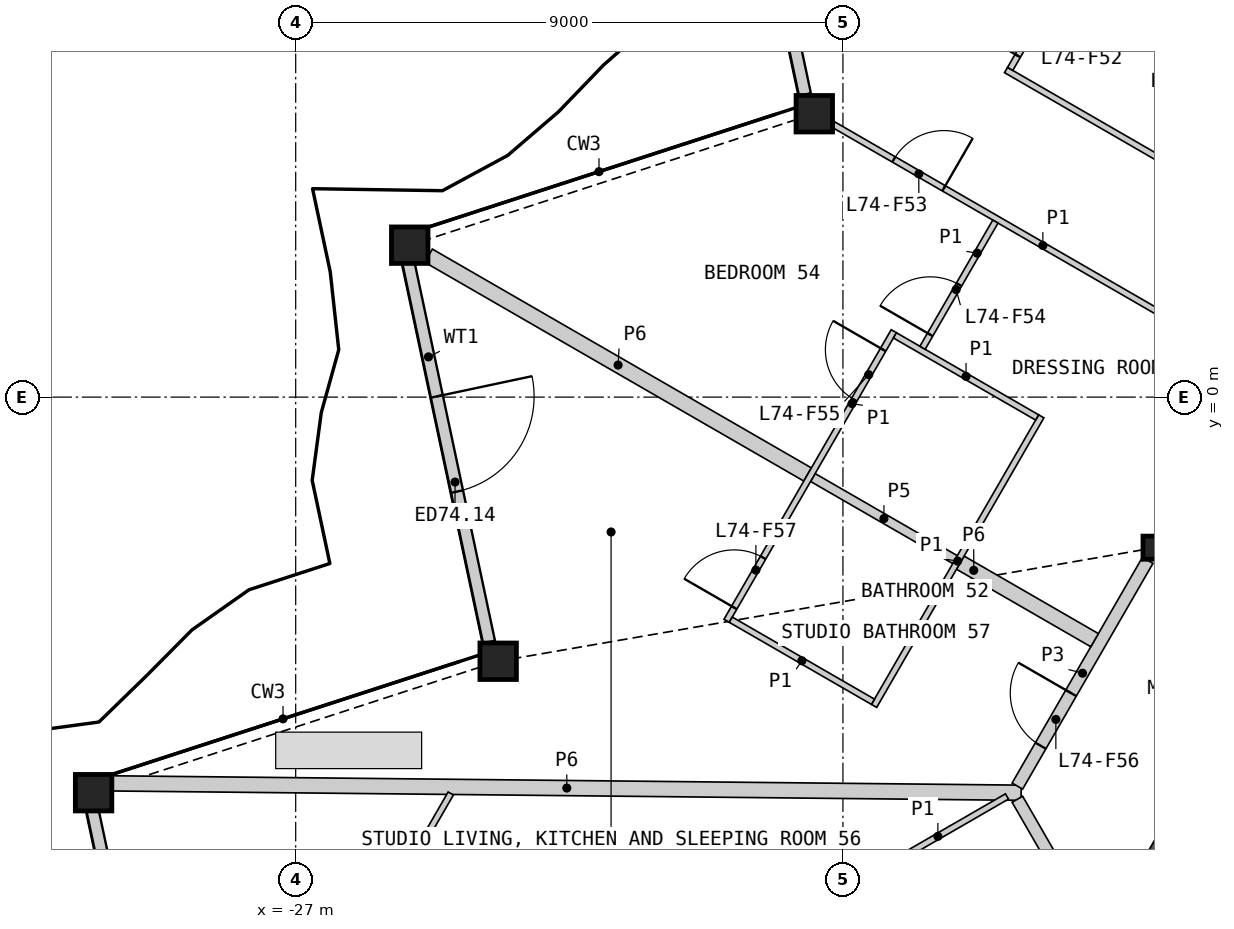
"""IFC4 building model, lengths in metres.
Left out: names, types, materials, properties, quantities, classifications, styles, units other than length and angle.
Written with IfcOpenShell. Run it as: python <this file> out.ifc"""

import sys

from ifc_helpers import new_model, si_unit, direction, frame, frame_2d, origin, origin_2d, place, context, subcontext, project, spatial, polyline, rectangle, hollow_rectangle, i_section, outline, extrude, element, fill, save


model = new_model("IFC4")
c1 = context("Model", 3, precision=1e-05, world=origin(), true_north=direction((0.0, 1.0)))
c2 = subcontext(c1, "Body", "Model", "MODEL_VIEW")
j1 = project(units=[si_unit("LENGTHUNIT", "METRE"), si_unit("PLANEANGLEUNIT", "RADIAN")], contexts=[c1])
p1 = place(None, origin())
s1 = spatial("IfcSite", under=j1, at=p1, CompositionType="ELEMENT")
p2 = place(p1, origin())
s2 = spatial("IfcBuilding", under=s1, at=p2, CompositionType="ELEMENT")
p3 = place(p2, frame((0.0, 0.0, 332.4)))
s3 = spatial("IfcBuildingStorey", under=s2, at=p3, CompositionType="ELEMENT", Elevation=332.4)
for number, where, z_axis, x_axis in (
    (1, (-18.471, 4.661, 0.0), (0.0, 0.0, 1.0), (1.0, 0.0, 0.0)),
    (2, (-25.125, 2.499, 0.0), (0.0, 0.0, 1.0), (1.0, 0.0, 0.0)),
    (3, (-23.67, -4.344, 0.0), (0.0, 0.0, 1.0), (1.0, 0.0, 0.0)),
    (4, (-30.324, -6.506, 0.0), (0.0, 0.0, 1.0), (1.0, 0.0, 0.0)),
):
    element("IfcColumn", number, at=place(p3, frame(where, z_axis=z_axis, x_axis=x_axis)), inside=s3, PredefinedType="COLUMN", context=c2, shape_type="SweptSolid", body=[
        extrude(hollow_rectangle(XDim=0.6, YDim=0.6, WallThickness=0.04, at=origin_2d()), origin(), (0.0, 0.0, 1.0), 3.4),
    ])
p4 = place(p3, frame((-12.868, -2.476, 0.0), z_axis=(0.0, 0.0, 1.0), x_axis=(1.0, 0.0, 0.0)))
e5 = element("IfcColumn", 5, at=p4, inside=s3, PredefinedType="COLUMN", context=c2, shape_type="SweptSolid", body=[
    extrude(i_section(OverallWidth=0.396, OverallDepth=0.381, WebThickness=0.019, FlangeThickness=0.03, at=origin_2d()), origin(), (0.0, 0.0, 1.0), 3.4),
])
p5 = place(p3, frame((-19.953, 11.225, 0.0), z_axis=(0.0, 0.0, 1.0), x_axis=(0.207915447, -0.978146802325, 0.0)))
e6 = element("IfcWall", 6, at=p5, inside=s3, PredefinedType="SOLIDWALL", context=c2, shape_type="SweptSolid", body=[
    extrude(rectangle(XDim=6.387, YDim=0.2, at=frame_2d((3.193, 0.0))), origin(), (0.0, 0.0, 1.0), 2.488),
])
p6 = place(p5, frame((2.262, 0.0, 0.0)))
e7 = element("IfcOpeningElement", 7, at=p6, cuts=e6, PredefinedType="OPENING", context=c2, shape_type="SweptSolid", body=[
    extrude(rectangle(XDim=1.6, YDim=2.25, at=frame_2d((0.8, 1.125))), frame((0.0, 0.11, 0.0), z_axis=(0.0, -1.0, 0.0), x_axis=(1.0, 0.0, 0.0)), (0.0, 0.0, 1.0), 0.22),
])
p7 = place(p3, frame((-25.149, 2.224, 0.0), z_axis=(0.0, 0.0, 1.0), x_axis=(0.207906266269, -0.978148753742, 0.0)))
e8 = element("IfcWall", 8, at=p7, inside=s3, PredefinedType="SOLIDWALL", context=c2, shape_type="SweptSolid", body=[
    extrude(rectangle(XDim=6.392, YDim=0.2, at=frame_2d((3.196, 0.0))), origin(), (0.0, 0.0, 1.0), 2.488),
])
p8 = place(p7, frame((2.262, 0.0, 0.0)))
e9 = element("IfcOpeningElement", 9, at=p8, cuts=e8, PredefinedType="OPENING", context=c2, shape_type="SweptSolid", body=[
    extrude(rectangle(XDim=1.6, YDim=2.25, at=frame_2d((0.8, 1.125))), frame((0.0, 0.11, 0.0), z_axis=(0.0, -1.0, 0.0), x_axis=(1.0, 0.0, 0.0)), (0.0, 0.0, 1.0), 0.22),
])
p9 = place(p3, frame((-30.345, -6.776, 0.0), z_axis=(0.0, 0.0, 1.0), x_axis=(0.207897099812, -0.978150702034, 0.0)))
e10 = element("IfcWall", 10, at=p9, inside=s3, PredefinedType="SOLIDWALL", context=c2, shape_type="SweptSolid", body=[
    extrude(rectangle(XDim=6.396, YDim=0.2, at=frame_2d((3.198, 0.0))), origin(), (0.0, 0.0, 1.0), 2.488),
])
p10 = place(p9, frame((2.262, 0.0, 0.0)))
e11 = element("IfcOpeningElement", 11, at=p10, cuts=e10, PredefinedType="OPENING", context=c2, shape_type="SweptSolid", body=[
    extrude(rectangle(XDim=1.6, YDim=2.25, at=frame_2d((0.8, 1.125))), frame((0.0, 0.11, 0.0), z_axis=(0.0, -1.0, 0.0), x_axis=(1.0, 0.0, 0.0)), (0.0, 0.0, 1.0), 0.22),
])
p11 = place(p3, origin())
e12 = element("IfcWall", 12, at=p11, inside=s3, PredefinedType="SHEAR", context=c2, shape_type="SweptSolid", body=[
    extrude(outline(polyline([(-12.48, -6.606), (-11.961, -6.906), (-11.961, -7.506), (-13.0, -7.506), (-12.48, -6.606)])), origin(), (0.0, 0.0, 1.0), 3.1),
])
p12 = place(p3, frame((-30.014, -6.353, 0.0), z_axis=(0.0, 0.0, 1.0), x_axis=(0.999946875776, -0.010307551845, 0.0)))
e13 = element("IfcWall", 13, at=p12, inside=s3, PredefinedType="PARTITIONING", context=c2, shape_type="SweptSolid", body=[
    extrude(rectangle(XDim=14.946, YDim=0.25, at=frame_2d((7.473, 0.0))), origin(), (0.0, 0.0, 1.0), 2.33),
])
p13 = place(p3, frame((-19.615, 11.325, 0.0), z_axis=(0.0, 0.0, 1.0), x_axis=(0.86602139559, -0.500006942333, 0.0)))
e14 = element("IfcWall", 14, at=p13, inside=s3, PredefinedType="PARTITIONING", context=c2, shape_type="SweptSolid", body=[
    extrude(rectangle(XDim=12.505, YDim=0.25, at=frame_2d((6.252, 0.0))), origin(), (0.0, 0.0, 1.0), 2.33),
])
p14 = place(p3, frame((-24.815, 2.326, 0.0), z_axis=(0.0, 0.0, 1.0), x_axis=(0.866024038922, -0.500002364004, 0.0)))
e15 = element("IfcWall", 15, at=p14, inside=s3, PredefinedType="PARTITIONING", context=c2, shape_type="SweptSolid", body=[
    extrude(rectangle(XDim=7.198, YDim=0.25, at=frame_2d((3.599, 0.0))), origin(), (0.0, 0.0, 1.0), 2.33),
])
p15 = place(p3, frame((-15.131, -6.397, 0.0), z_axis=(0.0, 0.0, 1.0), x_axis=(0.500003406062, 0.866023437285, 0.0)))
e16 = element("IfcWall", 16, at=p15, inside=s3, PredefinedType="PARTITIONING", context=c2, shape_type="SweptSolid", body=[
    extrude(rectangle(XDim=4.288, YDim=0.2, at=frame_2d((2.144, 0.0))), origin(), (0.0, 0.0, 1.0), 3.1),
])
p16 = place(p15, frame((0.766, 0.0, 0.0)))
e17 = element("IfcOpeningElement", 17, at=p16, cuts=e16, PredefinedType="OPENING", context=c2, shape_type="SweptSolid", body=[
    extrude(rectangle(XDim=1.0, YDim=2.1, at=frame_2d((0.5, 1.05))), frame((0.0, 0.11, 0.0), z_axis=(0.0, -1.0, 0.0), x_axis=(1.0, 0.0, 0.0)), (0.0, 0.0, 1.0), 0.22),
])
p17 = place(p3, frame((-15.131, -6.614, 0.0), z_axis=(0.0, 0.0, 1.0), x_axis=(0.499967746641, -0.866044024469, 0.0)))
e18 = element("IfcWall", 18, at=p17, inside=s3, PredefinedType="PARTITIONING", context=c2, shape_type="SweptSolid", body=[
    extrude(rectangle(XDim=3.676, YDim=0.2, at=frame_2d((1.838, 0.0))), origin(), (0.0, 0.0, 1.0), 3.1),
])
p18 = place(p17, frame((2.426, 0.0, 0.0)))
e19 = element("IfcOpeningElement", 19, at=p18, cuts=e18, PredefinedType="OPENING", context=c2, shape_type="SweptSolid", body=[
    extrude(rectangle(XDim=1.0, YDim=2.1, at=frame_2d((0.5, 1.05))), frame((0.0, 0.11, 0.0), z_axis=(0.0, -1.0, 0.0), x_axis=(1.0, 0.0, 0.0)), (0.0, 0.0, 1.0), 0.22),
])
p19 = place(p3, frame((-16.07, -2.722, 0.0), z_axis=(0.0, 0.0, 1.0), x_axis=(0.866030925526, -0.499990435942, 0.0)))
e20 = element("IfcWall", 20, at=p19, inside=s3, PredefinedType="PARTITIONING", context=c2, shape_type="SweptSolid", body=[
    extrude(rectangle(XDim=2.55, YDim=0.25, at=frame_2d((1.275, 0.0))), origin(), (0.0, 0.0, 1.0), 2.33),
])
p20 = place(p3, frame((-18.495, -1.323, 0.0), z_axis=(0.0, 0.0, 1.0), x_axis=(0.866059108428, -0.4999416173, 0.0)))
e21 = element("IfcWall", 21, at=p20, inside=s3, PredefinedType="PLUMBINGWALL", context=c2, shape_type="SweptSolid", body=[
    extrude(rectangle(XDim=2.7, YDim=0.15, at=frame_2d((1.35, 0.0))), origin(), (0.0, 0.0, 1.0), 2.33),
])
p21 = place(p3, frame((-18.161, 4.485, 0.0), z_axis=(0.0, 0.0, 1.0), x_axis=(0.866023773276, -0.500002824113, 0.0)))
e22 = element("IfcWall", 22, at=p21, inside=s3, PredefinedType="PARTITIONING", context=c2, shape_type="SweptSolid", body=[
    extrude(rectangle(XDim=7.965, YDim=0.1, at=frame_2d((3.982, 0.0))), origin(), (0.0, 0.0, 1.0), 2.33),
])
p22 = place(p21, frame((1.152, 0.0, 0.0)))
e23 = element("IfcOpeningElement", 23, at=p22, cuts=e22, PredefinedType="OPENING", context=c2, shape_type="SweptSolid", body=[
    extrude(rectangle(XDim=0.95, YDim=2.1, at=frame_2d((0.475, 1.05))), frame((0.0, 0.06, 0.0), z_axis=(0.0, -1.0, 0.0), x_axis=(1.0, 0.0, 0.0)), (0.0, 0.0, 1.0), 0.12),
])
p23 = place(p3, frame((-15.318, 5.38, 0.0), z_axis=(0.0, 0.0, 1.0), x_axis=(0.866035260786, -0.499982926783, 0.0)))
e24 = element("IfcWall", 24, at=p23, inside=s3, PredefinedType="PARTITIONING", context=c2, shape_type="SweptSolid", body=[
    extrude(rectangle(XDim=5.95, YDim=0.1, at=frame_2d((2.975, 0.0))), origin(), (0.0, 0.0, 1.0), 2.33),
])
p24 = place(p3, frame((-17.488, -5.079, 0.0), z_axis=(0.0, 0.0, 1.0), x_axis=(0.499996545922, 0.866027397988, 0.0)))
e25 = element("IfcWall", 25, at=p24, inside=s3, PredefinedType="PARTITIONING", context=c2, shape_type="SweptSolid", body=[
    extrude(rectangle(XDim=5.5, YDim=0.1, at=frame_2d((2.75, 0.0))), origin(), (0.0, 0.0, 1.0), 2.33),
])
p25 = place(p3, frame((-19.913, -3.679, 0.0), z_axis=(0.0, 0.0, 1.0), x_axis=(0.500015767406, 0.866016300277, 0.0)))
e26 = element("IfcWall", 26, at=p25, inside=s3, PredefinedType="PARTITIONING", context=c2, shape_type="SweptSolid", body=[
    extrude(rectangle(XDim=5.5, YDim=0.1, at=frame_2d((2.75, 0.0))), origin(), (0.0, 0.0, 1.0), 2.33),
])
p26 = place(p25, frame((4.199, 0.0, 0.0)))
e27 = element("IfcOpeningElement", 27, at=p26, cuts=e26, PredefinedType="OPENING", context=c2, shape_type="SweptSolid", body=[
    extrude(rectangle(XDim=0.95, YDim=2.1, at=frame_2d((0.475, 1.05))), frame((0.0, 0.06, 0.0), z_axis=(0.0, -1.0, 0.0), x_axis=(1.0, 0.0, 0.0)), (0.0, 0.0, 1.0), 0.12),
])
p27 = place(p25, frame((0.25, 0.0, 0.0)))
e28 = element("IfcOpeningElement", 28, at=p27, cuts=e26, PredefinedType="OPENING", context=c2, shape_type="SweptSolid", body=[
    extrude(rectangle(XDim=0.95, YDim=2.1, at=frame_2d((0.475, 1.05))), frame((0.0, 0.06, 0.0), z_axis=(0.0, -1.0, 0.0), x_axis=(1.0, 0.0, 0.0)), (0.0, 0.0, 1.0), 0.12),
])
p28 = place(p3, frame((-26.65, -10.331, 0.0), z_axis=(0.0, 0.0, 1.0), x_axis=(0.499992938033, 0.866029480975, 0.0)))
e29 = element("IfcWall", 29, at=p28, inside=s3, PredefinedType="PARTITIONING", context=c2, shape_type="SweptSolid", body=[
    extrude(rectangle(XDim=4.401, YDim=0.1, at=frame_2d((2.201, 0.0))), origin(), (0.0, 0.0, 1.0), 2.33),
])
p29 = place(p28, frame((0.657, 0.0, 0.0)))
e30 = element("IfcOpeningElement", 30, at=p29, cuts=e29, PredefinedType="OPENING", context=c2, shape_type="SweptSolid", body=[
    extrude(rectangle(XDim=0.95, YDim=2.1, at=frame_2d((0.475, 1.05))), frame((0.0, 0.06, 0.0), z_axis=(0.0, -1.0, 0.0), x_axis=(1.0, 0.0, 0.0)), (0.0, 0.0, 1.0), 0.12),
])
p30 = place(p3, frame((-15.25, 5.398, 0.0), z_axis=(0.0, 0.0, 1.0), x_axis=(0.499959355765, 0.866048868473, 0.0)))
e31 = element("IfcWall", 31, at=p30, inside=s3, PredefinedType="PARTITIONING", context=c2, shape_type="SweptSolid", body=[
    extrude(rectangle(XDim=2.825, YDim=0.1, at=frame_2d((1.413, 0.0))), origin(), (0.0, 0.0, 1.0), 2.33),
])
p31 = place(p30, frame((0.25, 0.0, 0.0)))
e32 = element("IfcOpeningElement", 32, at=p31, cuts=e31, PredefinedType="OPENING", context=c2, shape_type="SweptSolid", body=[
    extrude(rectangle(XDim=0.95, YDim=2.1, at=frame_2d((0.475, 1.05))), frame((0.0, 0.06, 0.0), z_axis=(0.0, -1.0, 0.0), x_axis=(1.0, 0.0, 0.0)), (0.0, 0.0, 1.0), 0.12),
])
for number, where, z_axis, x_axis in (
    (33, (-19.844, -3.661, 0.0), (0.0, 0.0, 1.0), (0.866, -0.5, 0.0)),
    (34, (-17.145, 1.016, 0.0), (0.0, 0.0, 1.0), (0.866, -0.5, 0.0)),
):
    element("IfcWall", number, at=place(p3, frame(where, z_axis=z_axis, x_axis=x_axis)), inside=s3, PredefinedType="PARTITIONING", context=c2, shape_type="SweptSolid", body=[
        extrude(rectangle(XDim=2.7, YDim=0.1, at=frame_2d((1.35, 0.0))), origin(), (0.0, 0.0, 1.0), 2.33),
    ])
p32 = place(p3, frame((-17.575, -7.881, 0.0), z_axis=(0.0, 0.0, 1.0), x_axis=(0.866036909293, 0.499980071345, 0.0)))
e35 = element("IfcWall", 35, at=p32, inside=s3, PredefinedType="PARTITIONING", context=c2, shape_type="SweptSolid", body=[
    extrude(rectangle(XDim=2.625, YDim=0.1, at=frame_2d((1.312, 0.0))), origin(), (0.0, 0.0, 1.0), 2.33),
])
p33 = place(p3, frame((-16.691, 0.812, 0.0), z_axis=(0.0, 0.0, 1.0), x_axis=(0.499963527173, 0.866046460357, 0.0)))
e36 = element("IfcWall", 36, at=p33, inside=s3, PredefinedType="PARTITIONING", context=c2, shape_type="SweptSolid", body=[
    extrude(rectangle(XDim=2.396, YDim=0.1, at=frame_2d((1.198, 0.0))), origin(), (0.0, 0.0, 1.0), 2.33),
])
p34 = place(p33, frame((0.25, 0.0, 0.0)))
e37 = element("IfcOpeningElement", 37, at=p34, cuts=e36, PredefinedType="OPENING", context=c2, shape_type="SweptSolid", body=[
    extrude(rectangle(XDim=0.95, YDim=2.1, at=frame_2d((0.475, 1.05))), frame((0.0, 0.06, 0.0), z_axis=(0.0, -1.0, 0.0), x_axis=(1.0, 0.0, 0.0)), (0.0, 0.0, 1.0), 0.12),
])
p35 = place(p8, origin())
e38 = element("IfcDoor", 38, at=p35, inside=s3, OperationType="DOUBLE_DOOR_SINGLE_SWING", PredefinedType="DOOR", context=c2, shape_type="SweptSolid", body=[
    extrude(rectangle(XDim=1.6, YDim=2.25, at=frame_2d((0.8, 1.125))), frame((0.0, 0.025, 0.0), z_axis=(0.0, -1.0, 0.0), x_axis=(1.0, 0.0, 0.0)), (0.0, 0.0, 1.0), 0.05),
])
fill(e9, e38)
p36 = place(p31, origin())
e39 = element("IfcDoor", 39, at=p36, inside=s3, OperationType="SINGLE_SWING_LEFT", PredefinedType="DOOR", context=c2, shape_type="SweptSolid", body=[
    extrude(rectangle(XDim=0.95, YDim=2.1, at=frame_2d((0.475, 1.05))), frame((0.0, 0.025, 0.0), z_axis=(0.0, -1.0, 0.0), x_axis=(1.0, 0.0, 0.0)), (0.0, 0.0, 1.0), 0.05),
])
fill(e32, e39)
p37 = place(p22, origin())
e40 = element("IfcDoor", 40, at=p37, inside=s3, OperationType="SINGLE_SWING_RIGHT", PredefinedType="DOOR", context=c2, shape_type="SweptSolid", body=[
    extrude(rectangle(XDim=0.95, YDim=2.1, at=frame_2d((0.475, 1.05))), frame((0.0, 0.025, 0.0), z_axis=(0.0, -1.0, 0.0), x_axis=(1.0, 0.0, 0.0)), (0.0, 0.0, 1.0), 0.05),
])
fill(e23, e40)
p38 = place(p34, origin())
e41 = element("IfcDoor", 41, at=p38, inside=s3, OperationType="SINGLE_SWING_LEFT", PredefinedType="DOOR", context=c2, shape_type="SweptSolid", body=[
    extrude(rectangle(XDim=0.95, YDim=2.1, at=frame_2d((0.475, 1.05))), frame((0.0, 0.025, 0.0), z_axis=(0.0, -1.0, 0.0), x_axis=(1.0, 0.0, 0.0)), (0.0, 0.0, 1.0), 0.05),
])
fill(e37, e41)
p39 = place(p26, origin())
e42 = element("IfcDoor", 42, at=p39, inside=s3, OperationType="SINGLE_SWING_RIGHT", PredefinedType="DOOR", context=c2, shape_type="SweptSolid", body=[
    extrude(rectangle(XDim=0.95, YDim=2.1, at=frame_2d((0.475, 1.05))), frame((0.0, 0.025, 0.0), z_axis=(0.0, -1.0, 0.0), x_axis=(1.0, 0.0, 0.0)), (0.0, 0.0, 1.0), 0.05),
])
fill(e27, e42)
p40 = place(p16, origin())
e43 = element("IfcDoor", 43, at=p40, inside=s3, OperationType="SINGLE_SWING_RIGHT", PredefinedType="DOOR", context=c2, shape_type="SweptSolid", body=[
    extrude(rectangle(XDim=1.0, YDim=2.1, at=frame_2d((0.5, 1.05))), frame((0.0, 0.025, 0.0), z_axis=(0.0, -1.0, 0.0), x_axis=(1.0, 0.0, 0.0)), (0.0, 0.0, 1.0), 0.05),
])
fill(e17, e43)
p41 = place(p27, origin())
e44 = element("IfcDoor", 44, at=p41, inside=s3, OperationType="SINGLE_SWING_LEFT", PredefinedType="DOOR", context=c2, shape_type="SweptSolid", body=[
    extrude(rectangle(XDim=0.95, YDim=2.1, at=frame_2d((0.475, 1.05))), frame((0.0, 0.025, 0.0), z_axis=(0.0, -1.0, 0.0), x_axis=(1.0, 0.0, 0.0)), (0.0, 0.0, 1.0), 0.05),
])
fill(e28, e44)
save(model, sys.argv[1])
